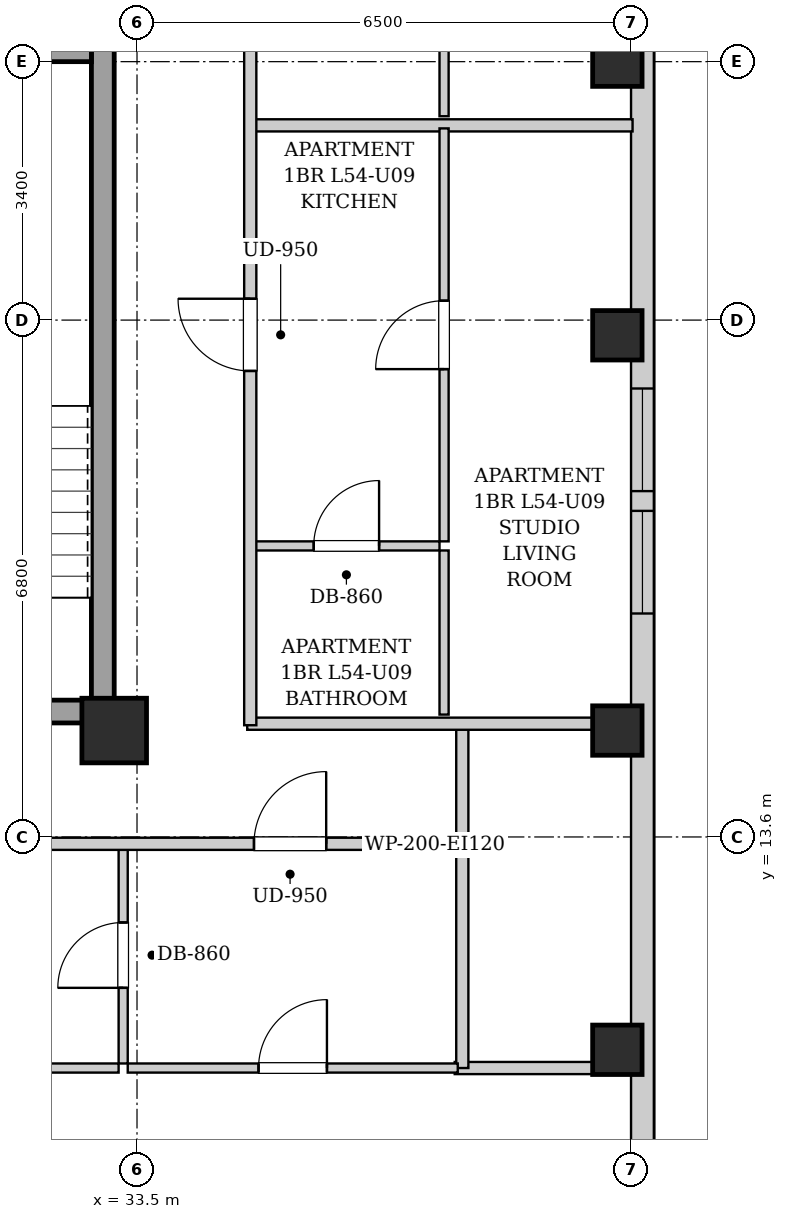
"""IFC4 building model, lengths in metres.
Left out: names, types, materials, properties, quantities, classifications, styles, units other than length and angle.
Written with IfcOpenShell. Run it as: python <this file> out.ifc"""

import sys

from ifc_helpers import new_model, si_unit, direction, frame, frame_2d, origin, origin_2d, place, context, subcontext, project, spatial, rectangle, extrude, element, fill, save


model = new_model("IFC4")
c1 = context("Model", 3, precision=1e-05, world=origin(), true_north=direction((0.0, 1.0)))
c2 = subcontext(c1, "Body", "Model", "MODEL_VIEW")
j1 = project(units=[si_unit("LENGTHUNIT", "METRE"), si_unit("PLANEANGLEUNIT", "RADIAN")], contexts=[c1])
p1 = place(None, origin())
s1 = spatial("IfcSite", under=j1, at=p1, CompositionType="ELEMENT")
p2 = place(p1, origin())
s2 = spatial("IfcBuilding", under=s1, at=p2, CompositionType="ELEMENT")
p3 = place(p2, frame((0.0, 0.0, 187.6)))
s3 = spatial("IfcBuildingStorey", under=s2, at=p3, CompositionType="ELEMENT", Elevation=187.6)
for number, where, z_axis, x_axis in (
    (1, (39.82, 10.8, 0.0), (0.0, 0.0, 1.0), (1.0, 0.0, 0.0)),
    (2, (39.82, 15.0, 0.0), (0.0, 0.0, 1.0), (1.0, 0.0, 0.0)),
    (3, (39.82, 20.2, 0.0), (0.0, 0.0, 1.0), (1.0, 0.0, 0.0)),
    (4, (39.82, 23.8, 0.0), (0.0, 0.0, 1.0), (1.0, 0.0, 0.0)),
):
    element("IfcColumn", number, at=place(p3, frame(where, z_axis=z_axis, x_axis=x_axis)), inside=s3, PredefinedType="COLUMN", context=c2, shape_type="SweptSolid", body=[
        extrude(rectangle(XDim=0.65, YDim=0.65, at=origin_2d()), origin(), (0.0, 0.0, 1.0), 3.3),
    ])
p4 = place(p3, frame((33.2, 15.0, 0.0), z_axis=(0.0, 0.0, 1.0), x_axis=(1.0, 0.0, 0.0)))
e5 = element("IfcColumn", 5, at=p4, inside=s3, PredefinedType="COLUMN", context=c2, shape_type="SweptSolid", body=[
    extrude(rectangle(XDim=0.85, YDim=0.85, at=origin_2d()), origin(), (0.0, 0.0, 1.0), 3.3),
])
p5 = place(p3, frame((40.15, 37.7, 0.0), z_axis=(0.0, 0.0, 1.0), x_axis=(0.0, -1.0, 0.0)))
e6 = element("IfcWall", 6, at=p5, inside=s3, PredefinedType="SOLIDWALL", context=c2, shape_type="SweptSolid", body=[
    extrude(rectangle(XDim=31.4, YDim=0.3, at=frame_2d((15.7, 0.0))), origin(), (0.0, 0.0, 1.0), 3.04),
])
p6 = place(p5, frame((1.504, 0.0, 0.55)))
e7 = element("IfcOpeningElement", 7, at=p6, cuts=e6, PredefinedType="OPENING", context=c2, shape_type="SweptSolid", body=[
    extrude(rectangle(XDim=1.35, YDim=1.2, at=frame_2d((0.675, 0.6))), frame((0.0, 0.16, 0.0), z_axis=(0.0, -1.0, 0.0), x_axis=(1.0, 0.0, 0.0)), (0.0, 0.0, 1.0), 0.32),
])
p7 = place(p5, frame((18.2, 0.0, 0.55)))
e8 = element("IfcOpeningElement", 8, at=p7, cuts=e6, PredefinedType="OPENING", context=c2, shape_type="SweptSolid", body=[
    extrude(rectangle(XDim=1.35, YDim=1.2, at=frame_2d((0.675, 0.6))), frame((0.0, 0.16, 0.0), z_axis=(0.0, -1.0, 0.0), x_axis=(1.0, 0.0, 0.0)), (0.0, 0.0, 1.0), 0.32),
])
p8 = place(p5, frame((19.81, 0.0, 0.55)))
e9 = element("IfcOpeningElement", 9, at=p8, cuts=e6, PredefinedType="OPENING", context=c2, shape_type="SweptSolid", body=[
    extrude(rectangle(XDim=1.35, YDim=1.2, at=frame_2d((0.675, 0.6))), frame((0.0, 0.16, 0.0), z_axis=(0.0, -1.0, 0.0), x_axis=(1.0, 0.0, 0.0)), (0.0, 0.0, 1.0), 0.32),
])
p9 = place(p5, frame((11.043, 0.0, 0.55)))
e10 = element("IfcOpeningElement", 10, at=p9, cuts=e6, PredefinedType="OPENING", context=c2, shape_type="SweptSolid", body=[
    extrude(rectangle(XDim=1.35, YDim=1.2, at=frame_2d((0.675, 0.6))), frame((0.0, 0.16, 0.0), z_axis=(0.0, -1.0, 0.0), x_axis=(1.0, 0.0, 0.0)), (0.0, 0.0, 1.0), 0.32),
])
p10 = place(p5, frame((9.185, 0.0, 0.55)))
e11 = element("IfcOpeningElement", 11, at=p10, cuts=e6, PredefinedType="OPENING", context=c2, shape_type="SweptSolid", body=[
    extrude(rectangle(XDim=1.35, YDim=1.2, at=frame_2d((0.675, 0.6))), frame((0.0, 0.16, 0.0), z_axis=(0.0, -1.0, 0.0), x_axis=(1.0, 0.0, 0.0)), (0.0, 0.0, 1.0), 0.32),
])
p11 = place(p3, frame((33.05, 15.1, 0.0), z_axis=(0.0, 0.0, 1.0), x_axis=(0.0, 1.0, 0.0)))
e12 = element("IfcWall", 12, at=p11, inside=s3, PredefinedType="SHEAR", context=c2, shape_type="SweptSolid", body=[
    extrude(rectangle(XDim=9.0, YDim=0.3, at=frame_2d((4.5, 0.0))), origin(), (0.0, 0.0, 1.0), 3.04),
])
p12 = place(p3, frame((30.05, 23.95, 0.0), z_axis=(0.0, 0.0, 1.0), x_axis=(1.0, 0.0, 0.0)))
e13 = element("IfcWall", 13, at=p12, inside=s3, PredefinedType="SHEAR", context=c2, shape_type="SweptSolid", body=[
    extrude(rectangle(XDim=2.85, YDim=0.3, at=frame_2d((1.425, 0.0))), origin(), (0.0, 0.0, 1.0), 3.04),
])
p13 = place(p3, frame((30.05, 15.25, 0.0), z_axis=(0.0, 0.0, 1.0), x_axis=(1.0, 0.0, 0.0)))
e14 = element("IfcWall", 14, at=p13, inside=s3, PredefinedType="SHEAR", context=c2, shape_type="SweptSolid", body=[
    extrude(rectangle(XDim=2.85, YDim=0.3, at=frame_2d((1.425, 0.0))), origin(), (0.0, 0.0, 1.0), 3.04),
])
p14 = place(p13, frame((0.86, 0.0, 0.0)))
e15 = element("IfcOpeningElement", 15, at=p14, cuts=e14, PredefinedType="OPENING", context=c2, shape_type="SweptSolid", body=[
    extrude(rectangle(XDim=1.1, YDim=2.05, at=frame_2d((0.55, 1.025))), frame((0.0, 0.16, 0.0), z_axis=(0.0, -1.0, 0.0), x_axis=(1.0, 0.0, 0.0)), (0.0, 0.0, 1.0), 0.32),
])
p15 = place(p3, frame((37.78, 13.51, 0.0), z_axis=(0.0, 0.0, 1.0), x_axis=(0.0, 1.0, 0.0)))
e16 = element("IfcWall", 16, at=p15, inside=s3, PredefinedType="PARTITIONING", context=c2, shape_type="SweptSolid", body=[
    extrude(rectangle(XDim=1.58, YDim=0.16, at=frame_2d((0.79, 0.0))), origin(), (0.0, 0.0, 1.0), 3.04),
])
p16 = place(p3, frame((34.95, 15.09, 0.0), z_axis=(0.0, 0.0, 1.0), x_axis=(1.0, 0.0, 0.0)))
e17 = element("IfcWall", 17, at=p16, inside=s3, PredefinedType="PARTITIONING", context=c2, shape_type="SweptSolid", body=[
    extrude(rectangle(XDim=5.07, YDim=0.16, at=frame_2d((2.535, 0.0))), origin(), (0.0, 0.0, 1.0), 2.556),
])
p17 = place(p3, frame((37.68, 10.56, 0.0), z_axis=(0.0, 0.0, 1.0), x_axis=(1.0, 0.0, 0.0)))
e18 = element("IfcWall", 18, at=p17, inside=s3, PredefinedType="PARTITIONING", context=c2, shape_type="SweptSolid", body=[
    extrude(rectangle(XDim=2.34, YDim=0.16, at=frame_2d((1.17, 0.0))), origin(), (0.0, 0.0, 1.0), 3.04),
])
p18 = place(p3, frame((37.78, 10.56, 0.0), z_axis=(0.0, 0.0, 1.0), x_axis=(0.0, 1.0, 0.0)))
e19 = element("IfcWall", 19, at=p18, inside=s3, PredefinedType="PARTITIONING", context=c2, shape_type="SweptSolid", body=[
    extrude(rectangle(XDim=2.91, YDim=0.16, at=frame_2d((1.455, 0.0))), origin(), (0.0, 0.0, 1.0), 3.04),
])
p19 = place(p3, frame((33.318, 10.62, 0.0), z_axis=(0.0, 0.0, 1.0), x_axis=(0.0, 1.0, 0.0)))
e20 = element("IfcWall", 20, at=p19, inside=s3, PredefinedType="PARTITIONING", context=c2, shape_type="SweptSolid", body=[
    extrude(rectangle(XDim=2.85, YDim=0.12, at=frame_2d((1.425, 0.0))), origin(), (0.0, 0.0, 1.0), 3.04),
])
p20 = place(p19, frame((0.995, 0.0, 0.0)))
e21 = element("IfcOpeningElement", 21, at=p20, cuts=e20, PredefinedType="OPENING", context=c2, shape_type="SweptSolid", body=[
    extrude(rectangle(XDim=0.86, YDim=2.05, at=frame_2d((0.43, 1.025))), frame((0.0, 0.07, 0.0), z_axis=(0.0, -1.0, 0.0), x_axis=(1.0, 0.0, 0.0)), (0.0, 0.0, 1.0), 0.14),
])
p21 = place(p3, frame((31.346, 10.56, 0.0), z_axis=(0.0, 0.0, 1.0), x_axis=(1.0, 0.0, 0.0)))
e22 = element("IfcWall", 22, at=p21, inside=s3, PredefinedType="PARTITIONING", context=c2, shape_type="SweptSolid", body=[
    extrude(rectangle(XDim=1.912, YDim=0.12, at=frame_2d((0.956, 0.0))), origin(), (0.0, 0.0, 1.0), 3.04),
])
p22 = place(p3, frame((33.378, 10.56, 0.0), z_axis=(0.0, 0.0, 1.0), x_axis=(1.0, 0.0, 0.0)))
e23 = element("IfcWall", 23, at=p22, inside=s3, PredefinedType="PARTITIONING", context=c2, shape_type="SweptSolid", body=[
    extrude(rectangle(XDim=4.342, YDim=0.12, at=frame_2d((2.171, 0.0))), origin(), (0.0, 0.0, 1.0), 3.04),
])
p23 = place(p22, frame((1.721, 0.0, 0.0)))
e24 = element("IfcOpeningElement", 24, at=p23, cuts=e23, PredefinedType="OPENING", context=c2, shape_type="SweptSolid", body=[
    extrude(rectangle(XDim=0.9, YDim=2.05, at=frame_2d((0.45, 1.025))), frame((0.0, 0.07, 0.0), z_axis=(0.0, -1.0, 0.0), x_axis=(1.0, 0.0, 0.0)), (0.0, 0.0, 1.0), 0.14),
])
p24 = place(p3, frame((35.03, 22.962, 0.0), z_axis=(0.0, 0.0, 1.0), x_axis=(1.0, 0.0, 0.0)))
e25 = element("IfcWall", 25, at=p24, inside=s3, PredefinedType="PARTITIONING", context=c2, shape_type="SweptSolid", body=[
    extrude(rectangle(XDim=4.99, YDim=0.16, at=frame_2d((2.495, 0.0))), origin(), (0.0, 0.0, 1.0), 3.04),
])
p25 = place(p3, frame((35.03, 17.429, 0.0), z_axis=(0.0, 0.0, 1.0), x_axis=(1.0, 0.0, 0.0)))
e26 = element("IfcWall", 26, at=p25, inside=s3, PredefinedType="PARTITIONING", context=c2, shape_type="SweptSolid", body=[
    extrude(rectangle(XDim=2.45, YDim=0.12, at=frame_2d((1.225, 0.0))), origin(), (0.0, 0.0, 1.0), 3.04),
])
p26 = place(p25, frame((0.795, 0.0, 0.0)))
e27 = element("IfcOpeningElement", 27, at=p26, cuts=e26, PredefinedType="OPENING", context=c2, shape_type="SweptSolid", body=[
    extrude(rectangle(XDim=0.86, YDim=2.05, at=frame_2d((0.43, 1.025))), frame((0.0, 0.07, 0.0), z_axis=(0.0, -1.0, 0.0), x_axis=(1.0, 0.0, 0.0)), (0.0, 0.0, 1.0), 0.14),
])
p27 = place(p3, frame((37.54, 15.21, 0.0), z_axis=(0.0, 0.0, 1.0), x_axis=(0.0, 1.0, 0.0)))
e28 = element("IfcWall", 28, at=p27, inside=s3, PredefinedType="PARTITIONING", context=c2, shape_type="SweptSolid", body=[
    extrude(rectangle(XDim=2.159, YDim=0.12, at=frame_2d((1.08, 0.0))), origin(), (0.0, 0.0, 1.0), 3.04),
])
p28 = place(p3, frame((37.54, 17.489, 0.0), z_axis=(0.0, 0.0, 1.0), x_axis=(0.0, 1.0, 0.0)))
e29 = element("IfcWall", 29, at=p28, inside=s3, PredefinedType="PARTITIONING", context=c2, shape_type="SweptSolid", body=[
    extrude(rectangle(XDim=5.433, YDim=0.12, at=frame_2d((2.717, 0.0))), origin(), (0.0, 0.0, 1.0), 3.04),
])
p29 = place(p28, frame((2.266, 0.0, 0.0)))
e30 = element("IfcOpeningElement", 30, at=p29, cuts=e29, PredefinedType="OPENING", context=c2, shape_type="SweptSolid", body=[
    extrude(rectangle(XDim=0.9, YDim=2.05, at=frame_2d((0.45, 1.025))), frame((0.0, 0.07, 0.0), z_axis=(0.0, -1.0, 0.0), x_axis=(1.0, 0.0, 0.0)), (0.0, 0.0, 1.0), 0.14),
])
p30 = place(p3, frame((37.54, 23.082, 0.0), z_axis=(0.0, 0.0, 1.0), x_axis=(0.0, 1.0, 0.0)))
e31 = element("IfcWall", 31, at=p30, inside=s3, PredefinedType="PARTITIONING", context=c2, shape_type="SweptSolid", body=[
    extrude(rectangle(XDim=1.85, YDim=0.12, at=frame_2d((0.925, 0.0))), origin(), (0.0, 0.0, 1.0), 3.04),
])
p31 = place(p3, frame((13.15, 13.51, 0.0), z_axis=(0.0, 0.0, 1.0), x_axis=(1.0, 0.0, 0.0)))
e32 = element("IfcWall", 32, at=p31, inside=s3, PredefinedType="PARTITIONING", context=c2, shape_type="SweptSolid", body=[
    extrude(rectangle(XDim=24.6, YDim=0.16, at=frame_2d((12.3, 0.0))), origin(), (0.0, 0.0, 1.0), 3.04),
])
p32 = place(p31, frame((0.76, 0.0, 0.0)))
e33 = element("IfcOpeningElement", 33, at=p32, cuts=e32, PredefinedType="OPENING", context=c2, shape_type="SweptSolid", body=[
    extrude(rectangle(XDim=0.95, YDim=2.1, at=frame_2d((0.475, 1.05))), frame((0.0, 0.09, 0.0), z_axis=(0.0, -1.0, 0.0), x_axis=(1.0, 0.0, 0.0)), (0.0, 0.0, 1.0), 0.18),
])
p33 = place(p31, frame((6.465, 0.0, 0.0)))
e34 = element("IfcOpeningElement", 34, at=p33, cuts=e32, PredefinedType="OPENING", context=c2, shape_type="SweptSolid", body=[
    extrude(rectangle(XDim=0.95, YDim=2.1, at=frame_2d((0.475, 1.05))), frame((0.0, 0.09, 0.0), z_axis=(0.0, -1.0, 0.0), x_axis=(1.0, 0.0, 0.0)), (0.0, 0.0, 1.0), 0.18),
])
p34 = place(p31, frame((21.889, 0.0, 0.0)))
e35 = element("IfcOpeningElement", 35, at=p34, cuts=e32, PredefinedType="OPENING", context=c2, shape_type="SweptSolid", body=[
    extrude(rectangle(XDim=0.95, YDim=2.1, at=frame_2d((0.475, 1.05))), frame((0.0, 0.09, 0.0), z_axis=(0.0, -1.0, 0.0), x_axis=(1.0, 0.0, 0.0)), (0.0, 0.0, 1.0), 0.18),
])
p35 = place(p3, frame((34.99, 15.07, 0.0), z_axis=(0.0, 0.0, 1.0), x_axis=(0.0, 1.0, 0.0)))
e36 = element("IfcWall", 36, at=p35, inside=s3, PredefinedType="PARTITIONING", context=c2, shape_type="SweptSolid", body=[
    extrude(rectangle(XDim=13.93, YDim=0.16, at=frame_2d((6.965, 0.0))), origin(), (0.0, 0.0, 1.0), 3.04),
])
p36 = place(p35, frame((4.661, 0.0, 0.0)))
e37 = element("IfcOpeningElement", 37, at=p36, cuts=e36, PredefinedType="OPENING", context=c2, shape_type="SweptSolid", body=[
    extrude(rectangle(XDim=0.95, YDim=2.1, at=frame_2d((0.475, 1.05))), frame((0.0, 0.09, 0.0), z_axis=(0.0, -1.0, 0.0), x_axis=(1.0, 0.0, 0.0)), (0.0, 0.0, 1.0), 0.18),
])
p37 = place(p35, frame((11.411, 0.0, 0.0)))
e38 = element("IfcOpeningElement", 38, at=p37, cuts=e36, PredefinedType="OPENING", context=c2, shape_type="SweptSolid", body=[
    extrude(rectangle(XDim=0.95, YDim=2.1, at=frame_2d((0.475, 1.05))), frame((0.0, 0.09, 0.0), z_axis=(0.0, -1.0, 0.0), x_axis=(1.0, 0.0, 0.0)), (0.0, 0.0, 1.0), 0.18),
])
p38 = place(p20, origin())
e39 = element("IfcDoor", 39, at=p38, inside=s3, OperationType="SINGLE_SWING_LEFT", PredefinedType="DOOR", context=c2, shape_type="SweptSolid", body=[
    extrude(rectangle(XDim=0.86, YDim=2.05, at=frame_2d((0.43, 1.025))), frame((0.0, 0.025, 0.0), z_axis=(0.0, -1.0, 0.0), x_axis=(1.0, 0.0, 0.0)), (0.0, 0.0, 1.0), 0.05),
])
fill(e21, e39)
p39 = place(p23, origin())
e40 = element("IfcDoor", 40, at=p39, inside=s3, OperationType="SINGLE_SWING_RIGHT", PredefinedType="DOOR", context=c2, shape_type="SweptSolid", body=[
    extrude(rectangle(XDim=0.9, YDim=2.05, at=frame_2d((0.45, 1.025))), frame((0.0, 0.025, 0.0), z_axis=(0.0, -1.0, 0.0), x_axis=(1.0, 0.0, 0.0)), (0.0, 0.0, 1.0), 0.05),
])
fill(e24, e40)
p40 = place(p26, origin())
e41 = element("IfcDoor", 41, at=p40, inside=s3, OperationType="SINGLE_SWING_RIGHT", PredefinedType="DOOR", context=c2, shape_type="SweptSolid", body=[
    extrude(rectangle(XDim=0.86, YDim=2.05, at=frame_2d((0.43, 1.025))), frame((0.0, 0.025, 0.0), z_axis=(0.0, -1.0, 0.0), x_axis=(1.0, 0.0, 0.0)), (0.0, 0.0, 1.0), 0.05),
])
fill(e27, e41)
p41 = place(p29, origin())
e42 = element("IfcDoor", 42, at=p41, inside=s3, OperationType="SINGLE_SWING_LEFT", PredefinedType="DOOR", context=c2, shape_type="SweptSolid", body=[
    extrude(rectangle(XDim=0.9, YDim=2.05, at=frame_2d((0.45, 1.025))), frame((0.0, 0.025, 0.0), z_axis=(0.0, -1.0, 0.0), x_axis=(1.0, 0.0, 0.0)), (0.0, 0.0, 1.0), 0.05),
])
fill(e30, e42)
p42 = place(p34, origin())
e43 = element("IfcDoor", 43, at=p42, inside=s3, OperationType="SINGLE_SWING_RIGHT", PredefinedType="DOOR", context=c2, shape_type="SweptSolid", body=[
    extrude(rectangle(XDim=0.95, YDim=2.1, at=frame_2d((0.475, 1.05))), frame((0.0, 0.025, 0.0), z_axis=(0.0, -1.0, 0.0), x_axis=(1.0, 0.0, 0.0)), (0.0, 0.0, 1.0), 0.05),
])
fill(e35, e43)
p43 = place(p36, origin())
e44 = element("IfcDoor", 44, at=p43, inside=s3, OperationType="SINGLE_SWING_RIGHT", PredefinedType="DOOR", context=c2, shape_type="SweptSolid", body=[
    extrude(rectangle(XDim=0.95, YDim=2.1, at=frame_2d((0.475, 1.05))), frame((0.0, 0.025, 0.0), z_axis=(0.0, -1.0, 0.0), x_axis=(1.0, 0.0, 0.0)), (0.0, 0.0, 1.0), 0.05),
])
fill(e37, e44)
p44 = place(p7, origin())
e45 = element("IfcWindow", 45, at=p44, inside=s3, PartitioningType="SINGLE_PANEL", PredefinedType="WINDOW", context=c2, shape_type="SweptSolid", body=[
    extrude(rectangle(XDim=1.35, YDim=1.2, at=frame_2d((0.675, 0.6))), frame((0.0, 0.03, 0.0), z_axis=(0.0, -1.0, 0.0), x_axis=(1.0, 0.0, 0.0)), (0.0, 0.0, 1.0), 0.06),
])
fill(e8, e45)
p45 = place(p8, origin())
e46 = element("IfcWindow", 46, at=p45, inside=s3, PartitioningType="SINGLE_PANEL", PredefinedType="WINDOW", context=c2, shape_type="SweptSolid", body=[
    extrude(rectangle(XDim=1.35, YDim=1.2, at=frame_2d((0.675, 0.6))), frame((0.0, 0.03, 0.0), z_axis=(0.0, -1.0, 0.0), x_axis=(1.0, 0.0, 0.0)), (0.0, 0.0, 1.0), 0.06),
])
fill(e9, e46)
save(model, sys.argv[1])
